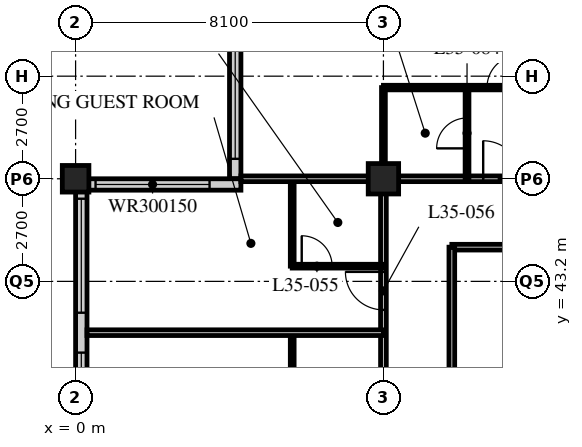
"""IFC4 building model, lengths in metres.
Left out: names, types, materials, properties, quantities, classifications, styles, units other than length and angle.
Written with IfcOpenShell. Run it as: python <this file> out.ifc"""

import sys

from ifc_helpers import new_model, si_unit, direction, frame, frame_2d, origin, origin_2d, place, context, subcontext, project, spatial, rectangle, hollow_rectangle, extrude, element, fill, save


model = new_model("IFC4")
c1 = context("Model", 3, precision=1e-05, world=origin(), true_north=direction((0.0, 1.0)))
c2 = subcontext(c1, "Body", "Model", "MODEL_VIEW")
j1 = project(units=[si_unit("LENGTHUNIT", "METRE"), si_unit("PLANEANGLEUNIT", "RADIAN")], contexts=[c1])
p1 = place(None, origin())
s1 = spatial("IfcSite", under=j1, at=p1, CompositionType="ELEMENT")
p2 = place(p1, origin())
s2 = spatial("IfcBuilding", under=s1, at=p2, CompositionType="ELEMENT")
p3 = place(p2, frame((0.0, 0.0, 137.4)))
s3 = spatial("IfcBuildingStorey", under=s2, at=p3, CompositionType="ELEMENT", Elevation=137.4)
p4 = place(p3, frame((0.0, 45.9, 0.0), z_axis=(0.0, 0.0, 1.0), x_axis=(1.0, 0.0, 0.0)))
e1 = element("IfcColumn", 1, at=p4, inside=s3, PredefinedType="COLUMN", context=c2, shape_type="SweptSolid", body=[
    extrude(hollow_rectangle(XDim=0.7, YDim=0.7, WallThickness=0.07, at=origin_2d()), origin(), (0.0, 0.0, 1.0), 3.4),
])
p5 = place(p3, frame((8.1, 45.9, 0.0), z_axis=(0.0, 0.0, 1.0), x_axis=(1.0, 0.0, 0.0)))
e2 = element("IfcColumn", 2, at=p5, inside=s3, PredefinedType="COLUMN", context=c2, shape_type="SweptSolid", body=[
    extrude(hollow_rectangle(XDim=0.8, YDim=0.8, WallThickness=0.08, at=origin_2d()), origin(), (0.0, 0.0, 1.0), 3.4),
])
p6 = place(p3, frame((4.2, 49.65, 0.0), z_axis=(0.0, 0.0, 1.0), x_axis=(0.0, -1.0, 0.0)))
e3 = element("IfcWall", 3, at=p6, inside=s3, PredefinedType="SOLIDWALL", context=c2, shape_type="SweptSolid", body=[
    extrude(rectangle(XDim=3.75, YDim=0.3, at=frame_2d((1.875, 0.0))), origin(), (0.0, 0.0, 1.0), 3.19),
])
p7 = place(p6, frame((0.225, 0.0, 0.9)))
e4 = element("IfcOpeningElement", 4, at=p7, cuts=e3, PredefinedType="OPENING", context=c2, shape_type="SweptSolid", body=[
    extrude(rectangle(XDim=3.0, YDim=1.5, at=frame_2d((1.5, 0.75))), frame((0.0, 0.16, 0.0), z_axis=(0.0, -1.0, 0.0), x_axis=(1.0, 0.0, 0.0)), (0.0, 0.0, 1.0), 0.32),
])
p8 = place(p3, frame((4.35, 45.75, 0.0), z_axis=(0.0, 0.0, 1.0), x_axis=(-1.0, 0.0, 0.0)))
e5 = element("IfcWall", 5, at=p8, inside=s3, PredefinedType="SOLIDWALL", context=c2, shape_type="SweptSolid", body=[
    extrude(rectangle(XDim=4.35, YDim=0.3, at=frame_2d((2.175, 0.0))), origin(), (0.0, 0.0, 1.0), 3.19),
])
p9 = place(p8, frame((0.825, 0.0, 0.9)))
e6 = element("IfcOpeningElement", 6, at=p9, cuts=e5, PredefinedType="OPENING", context=c2, shape_type="SweptSolid", body=[
    extrude(rectangle(XDim=3.0, YDim=1.5, at=frame_2d((1.5, 0.75))), frame((0.0, 0.16, 0.0), z_axis=(0.0, -1.0, 0.0), x_axis=(1.0, 0.0, 0.0)), (0.0, 0.0, 1.0), 0.32),
])
p10 = place(p3, frame((0.15, 45.6, 0.0), z_axis=(0.0, 0.0, 1.0), x_axis=(0.0, -1.0, 0.0)))
e7 = element("IfcWall", 7, at=p10, inside=s3, PredefinedType="SOLIDWALL", context=c2, shape_type="SweptSolid", body=[
    extrude(rectangle(XDim=32.1, YDim=0.3, at=frame_2d((16.05, 0.0))), origin(), (0.0, 0.0, 1.0), 3.19),
])
p11 = place(p10, frame((0.225, 0.0, 0.9)))
e8 = element("IfcOpeningElement", 8, at=p11, cuts=e7, PredefinedType="OPENING", context=c2, shape_type="SweptSolid", body=[
    extrude(rectangle(XDim=3.0, YDim=2.0, at=frame_2d((1.5, 1.0))), frame((0.0, 0.16, 0.0), z_axis=(0.0, -1.0, 0.0), x_axis=(1.0, 0.0, 0.0)), (0.0, 0.0, 1.0), 0.32),
])
p12 = place(p10, frame((4.275, 0.0, 0.9)))
e9 = element("IfcOpeningElement", 9, at=p12, cuts=e7, PredefinedType="OPENING", context=c2, shape_type="SweptSolid", body=[
    extrude(rectangle(XDim=3.0, YDim=2.0, at=frame_2d((1.5, 1.0))), frame((0.0, 0.16, 0.0), z_axis=(0.0, -1.0, 0.0), x_axis=(1.0, 0.0, 0.0)), (0.0, 0.0, 1.0), 0.32),
])
p13 = place(p10, frame((8.325, 0.0, 0.9)))
e10 = element("IfcOpeningElement", 10, at=p13, cuts=e7, PredefinedType="OPENING", context=c2, shape_type="SweptSolid", body=[
    extrude(rectangle(XDim=3.0, YDim=2.0, at=frame_2d((1.5, 1.0))), frame((0.0, 0.16, 0.0), z_axis=(0.0, -1.0, 0.0), x_axis=(1.0, 0.0, 0.0)), (0.0, 0.0, 1.0), 0.32),
])
p14 = place(p10, frame((12.375, 0.0, 0.9)))
e11 = element("IfcOpeningElement", 11, at=p14, cuts=e7, PredefinedType="OPENING", context=c2, shape_type="SweptSolid", body=[
    extrude(rectangle(XDim=3.0, YDim=2.0, at=frame_2d((1.5, 1.0))), frame((0.0, 0.16, 0.0), z_axis=(0.0, -1.0, 0.0), x_axis=(1.0, 0.0, 0.0)), (0.0, 0.0, 1.0), 0.32),
])
p15 = place(p10, frame((16.425, 0.0, 0.9)))
e12 = element("IfcOpeningElement", 12, at=p15, cuts=e7, PredefinedType="OPENING", context=c2, shape_type="SweptSolid", body=[
    extrude(rectangle(XDim=3.0, YDim=2.0, at=frame_2d((1.5, 1.0))), frame((0.0, 0.16, 0.0), z_axis=(0.0, -1.0, 0.0), x_axis=(1.0, 0.0, 0.0)), (0.0, 0.0, 1.0), 0.32),
])
p16 = place(p10, frame((20.475, 0.0, 0.9)))
e13 = element("IfcOpeningElement", 13, at=p16, cuts=e7, PredefinedType="OPENING", context=c2, shape_type="SweptSolid", body=[
    extrude(rectangle(XDim=3.0, YDim=2.0, at=frame_2d((1.5, 1.0))), frame((0.0, 0.16, 0.0), z_axis=(0.0, -1.0, 0.0), x_axis=(1.0, 0.0, 0.0)), (0.0, 0.0, 1.0), 0.32),
])
p17 = place(p10, frame((24.525, 0.0, 0.9)))
e14 = element("IfcOpeningElement", 14, at=p17, cuts=e7, PredefinedType="OPENING", context=c2, shape_type="SweptSolid", body=[
    extrude(rectangle(XDim=3.0, YDim=2.0, at=frame_2d((1.5, 1.0))), frame((0.0, 0.16, 0.0), z_axis=(0.0, -1.0, 0.0), x_axis=(1.0, 0.0, 0.0)), (0.0, 0.0, 1.0), 0.32),
])
p18 = place(p10, frame((28.575, 0.0, 0.9)))
e15 = element("IfcOpeningElement", 15, at=p18, cuts=e7, PredefinedType="OPENING", context=c2, shape_type="SweptSolid", body=[
    extrude(rectangle(XDim=3.0, YDim=2.0, at=frame_2d((1.5, 1.0))), frame((0.0, 0.16, 0.0), z_axis=(0.0, -1.0, 0.0), x_axis=(1.0, 0.0, 0.0)), (0.0, 0.0, 1.0), 0.32),
])
p19 = place(p3, frame((8.1, 45.9, 0.0), z_axis=(0.0, 0.0, 1.0), x_axis=(1.0, 0.0, 0.0)))
e16 = element("IfcWall", 16, at=p19, inside=s3, PredefinedType="PARTITIONING", context=c2, shape_type="SweptSolid", body=[
    extrude(rectangle(XDim=36.45, YDim=0.15, at=frame_2d((18.225, 0.0))), origin(), (0.0, 0.0, 1.0), 2.578),
])
p20 = place(p19, frame((9.625, 0.0, 0.0)))
e17 = element("IfcOpeningElement", 17, at=p20, cuts=e16, PredefinedType="OPENING", context=c2, shape_type="SweptSolid", body=[
    extrude(rectangle(XDim=1.0, YDim=2.1, at=frame_2d((0.5, 1.05))), frame((0.0, 0.085, 0.0), z_axis=(0.0, -1.0, 0.0), x_axis=(1.0, 0.0, 0.0)), (0.0, 0.0, 1.0), 0.17),
])
p21 = place(p19, frame((21.775, 0.0, 0.0)))
e18 = element("IfcOpeningElement", 18, at=p21, cuts=e16, PredefinedType="OPENING", context=c2, shape_type="SweptSolid", body=[
    extrude(rectangle(XDim=1.0, YDim=2.1, at=frame_2d((0.5, 1.05))), frame((0.0, 0.085, 0.0), z_axis=(0.0, -1.0, 0.0), x_axis=(1.0, 0.0, 0.0)), (0.0, 0.0, 1.0), 0.17),
])
p22 = place(p19, frame((28.95, 0.0, 0.0)))
e19 = element("IfcOpeningElement", 19, at=p22, cuts=e16, PredefinedType="OPENING", context=c2, shape_type="SweptSolid", body=[
    extrude(rectangle(XDim=1.0, YDim=2.1, at=frame_2d((0.5, 1.05))), frame((0.0, 0.085, 0.0), z_axis=(0.0, -1.0, 0.0), x_axis=(1.0, 0.0, 0.0)), (0.0, 0.0, 1.0), 0.17),
])
p23 = place(p19, frame((33.925, 0.0, 0.0)))
e20 = element("IfcOpeningElement", 20, at=p23, cuts=e16, PredefinedType="OPENING", context=c2, shape_type="SweptSolid", body=[
    extrude(rectangle(XDim=1.0, YDim=2.1, at=frame_2d((0.5, 1.05))), frame((0.0, 0.085, 0.0), z_axis=(0.0, -1.0, 0.0), x_axis=(1.0, 0.0, 0.0)), (0.0, 0.0, 1.0), 0.17),
])
p24 = place(p19, frame((2.625, 0.0, 0.0)))
e21 = element("IfcOpeningElement", 21, at=p24, cuts=e16, PredefinedType="OPENING", context=c2, shape_type="SweptSolid", body=[
    extrude(rectangle(XDim=1.0, YDim=2.1, at=frame_2d((0.5, 1.05))), frame((0.0, 0.085, 0.0), z_axis=(0.0, -1.0, 0.0), x_axis=(1.0, 0.0, 0.0)), (0.0, 0.0, 1.0), 0.17),
])
p25 = place(p3, frame((8.1, 17.55, 0.0), z_axis=(0.0, 0.0, 1.0), x_axis=(0.0, 1.0, 0.0)))
e22 = element("IfcWall", 22, at=p25, inside=s3, PredefinedType="PARTITIONING", context=c2, shape_type="SweptSolid", body=[
    extrude(rectangle(XDim=28.35, YDim=0.15, at=frame_2d((14.175, 0.0))), origin(), (0.0, 0.0, 1.0), 2.578),
])
p26 = place(p25, frame((1.9, 0.0, 0.0)))
e23 = element("IfcOpeningElement", 23, at=p26, cuts=e22, PredefinedType="OPENING", context=c2, shape_type="SweptSolid", body=[
    extrude(rectangle(XDim=1.0, YDim=2.1, at=frame_2d((0.5, 1.05))), frame((0.0, 0.085, 0.0), z_axis=(0.0, -1.0, 0.0), x_axis=(1.0, 0.0, 0.0)), (0.0, 0.0, 1.0), 0.17),
])
p27 = place(p25, frame((10.0, 0.0, 0.0)))
e24 = element("IfcOpeningElement", 24, at=p27, cuts=e22, PredefinedType="OPENING", context=c2, shape_type="SweptSolid", body=[
    extrude(rectangle(XDim=1.0, YDim=2.1, at=frame_2d((0.5, 1.05))), frame((0.0, 0.085, 0.0), z_axis=(0.0, -1.0, 0.0), x_axis=(1.0, 0.0, 0.0)), (0.0, 0.0, 1.0), 0.17),
])
p28 = place(p25, frame((18.1, 0.0, 0.0)))
e25 = element("IfcOpeningElement", 25, at=p28, cuts=e22, PredefinedType="OPENING", context=c2, shape_type="SweptSolid", body=[
    extrude(rectangle(XDim=1.0, YDim=2.1, at=frame_2d((0.5, 1.05))), frame((0.0, 0.085, 0.0), z_axis=(0.0, -1.0, 0.0), x_axis=(1.0, 0.0, 0.0)), (0.0, 0.0, 1.0), 0.17),
])
p29 = place(p25, frame((24.9, 0.0, 0.0)))
e26 = element("IfcOpeningElement", 26, at=p29, cuts=e22, PredefinedType="OPENING", context=c2, shape_type="SweptSolid", body=[
    extrude(rectangle(XDim=1.0, YDim=2.1, at=frame_2d((0.5, 1.05))), frame((0.0, 0.085, 0.0), z_axis=(0.0, -1.0, 0.0), x_axis=(1.0, 0.0, 0.0)), (0.0, 0.0, 1.0), 0.17),
])
p30 = place(p3, frame((27.14, 44.1, 0.0), z_axis=(0.0, 0.0, 1.0), x_axis=(-1.0, 0.0, 0.0)))
e27 = element("IfcWall", 27, at=p30, inside=s3, PredefinedType="PARTITIONING", context=c2, shape_type="SweptSolid", body=[
    extrude(rectangle(XDim=17.24, YDim=0.15, at=frame_2d((8.62, 0.0))), origin(), (0.0, 0.0, 1.0), 3.19),
])
p31 = place(p30, frame((13.59, 0.0, 0.0)))
e28 = element("IfcOpeningElement", 28, at=p31, cuts=e27, PredefinedType="OPENING", context=c2, shape_type="SweptSolid", body=[
    extrude(rectangle(XDim=1.0, YDim=2.1, at=frame_2d((0.5, 1.05))), frame((0.0, 0.085, 0.0), z_axis=(0.0, -1.0, 0.0), x_axis=(1.0, 0.0, 0.0)), (0.0, 0.0, 1.0), 0.17),
])
p32 = place(p30, frame((9.051, 0.0, 0.0)))
e29 = element("IfcOpeningElement", 29, at=p32, cuts=e27, PredefinedType="OPENING", context=c2, shape_type="SweptSolid", body=[
    extrude(rectangle(XDim=1.0, YDim=2.1, at=frame_2d((0.5, 1.05))), frame((0.0, 0.085, 0.0), z_axis=(0.0, -1.0, 0.0), x_axis=(1.0, 0.0, 0.0)), (0.0, 0.0, 1.0), 0.17),
])
p33 = place(p30, frame((3.576, 0.0, 0.0)))
e30 = element("IfcOpeningElement", 30, at=p33, cuts=e27, PredefinedType="OPENING", context=c2, shape_type="SweptSolid", body=[
    extrude(rectangle(XDim=1.0, YDim=2.1, at=frame_2d((0.5, 1.05))), frame((0.0, 0.085, 0.0), z_axis=(0.0, -1.0, 0.0), x_axis=(1.0, 0.0, 0.0)), (0.0, 0.0, 1.0), 0.17),
])
p34 = place(p3, frame((9.9, 44.1, 0.0), z_axis=(0.0, 0.0, 1.0), x_axis=(0.0, -1.0, 0.0)))
e31 = element("IfcWall", 31, at=p34, inside=s3, PredefinedType="PARTITIONING", context=c2, shape_type="SweptSolid", body=[
    extrude(rectangle(XDim=24.75, YDim=0.15, at=frame_2d((12.375, 0.0))), origin(), (0.0, 0.0, 1.0), 3.19),
])
p35 = place(p34, frame((17.871, 0.0, 0.0)))
e32 = element("IfcOpeningElement", 32, at=p35, cuts=e31, PredefinedType="OPENING", context=c2, shape_type="SweptSolid", body=[
    extrude(rectangle(XDim=1.0, YDim=2.1, at=frame_2d((0.5, 1.05))), frame((0.0, 0.085, 0.0), z_axis=(0.0, -1.0, 0.0), x_axis=(1.0, 0.0, 0.0)), (0.0, 0.0, 1.0), 0.17),
])
p36 = place(p34, frame((13.821, 0.0, 0.0)))
e33 = element("IfcOpeningElement", 33, at=p36, cuts=e31, PredefinedType="OPENING", context=c2, shape_type="SweptSolid", body=[
    extrude(rectangle(XDim=1.0, YDim=2.1, at=frame_2d((0.5, 1.05))), frame((0.0, 0.085, 0.0), z_axis=(0.0, -1.0, 0.0), x_axis=(1.0, 0.0, 0.0)), (0.0, 0.0, 1.0), 0.17),
])
p37 = place(p34, frame((10.4, 0.0, 0.0)))
e34 = element("IfcOpeningElement", 34, at=p37, cuts=e31, PredefinedType="OPENING", context=c2, shape_type="SweptSolid", body=[
    extrude(rectangle(XDim=1.0, YDim=2.1, at=frame_2d((0.5, 1.05))), frame((0.0, 0.085, 0.0), z_axis=(0.0, -1.0, 0.0), x_axis=(1.0, 0.0, 0.0)), (0.0, 0.0, 1.0), 0.17),
])
p38 = place(p34, frame((6.35, 0.0, 0.0)))
e35 = element("IfcOpeningElement", 35, at=p38, cuts=e31, PredefinedType="OPENING", context=c2, shape_type="SweptSolid", body=[
    extrude(rectangle(XDim=1.0, YDim=2.1, at=frame_2d((0.5, 1.05))), frame((0.0, 0.085, 0.0), z_axis=(0.0, -1.0, 0.0), x_axis=(1.0, 0.0, 0.0)), (0.0, 0.0, 1.0), 0.17),
])
p39 = place(p3, frame((5.7, 39.25, 0.0), z_axis=(0.0, 0.0, 1.0), x_axis=(0.0, 1.0, 0.0)))
e36 = element("IfcWall", 36, at=p39, inside=s3, PredefinedType="PARTITIONING", context=c2, shape_type="SweptSolid", body=[
    extrude(rectangle(XDim=2.6, YDim=0.1, at=frame_2d((1.3, 0.0))), origin(), (0.0, 0.0, 1.0), 3.19),
])
p40 = place(p3, frame((8.1, 41.85, 0.0), z_axis=(0.0, 0.0, 1.0), x_axis=(-1.0, 0.0, 0.0)))
e37 = element("IfcWall", 37, at=p40, inside=s3, PredefinedType="PARTITIONING", context=c2, shape_type="SweptSolid", body=[
    extrude(rectangle(XDim=7.8, YDim=0.15, at=frame_2d((3.9, 0.0))), origin(), (0.0, 0.0, 1.0), 3.19),
])
p41 = place(p3, frame((5.7, 43.6, 0.0), z_axis=(0.0, 0.0, 1.0), x_axis=(0.0, 1.0, 0.0)))
e38 = element("IfcWall", 38, at=p41, inside=s3, PredefinedType="PARTITIONING", context=c2, shape_type="SweptSolid", body=[
    extrude(rectangle(XDim=2.3, YDim=0.1, at=frame_2d((1.15, 0.0))), origin(), (0.0, 0.0, 1.0), 3.19),
])
p42 = place(p3, frame((8.1, 43.6, 0.0), z_axis=(0.0, 0.0, 1.0), x_axis=(-1.0, 0.0, 0.0)))
e39 = element("IfcWall", 39, at=p42, inside=s3, PredefinedType="PARTITIONING", context=c2, shape_type="SweptSolid", body=[
    extrude(rectangle(XDim=2.4, YDim=0.1, at=frame_2d((1.2, 0.0))), origin(), (0.0, 0.0, 1.0), 3.19),
])
p43 = place(p42, frame((1.35, 0.0, 0.0)))
e40 = element("IfcOpeningElement", 40, at=p43, cuts=e39, PredefinedType="OPENING", context=c2, shape_type="SweptSolid", body=[
    extrude(rectangle(XDim=0.8, YDim=2.1, at=frame_2d((0.4, 1.05))), frame((0.0, 0.06, 0.0), z_axis=(0.0, -1.0, 0.0), x_axis=(1.0, 0.0, 0.0)), (0.0, 0.0, 1.0), 0.12),
])
p44 = place(p3, frame((8.1, 48.3, 0.0), z_axis=(0.0, 0.0, 1.0), x_axis=(1.0, 0.0, 0.0)))
e41 = element("IfcWall", 41, at=p44, inside=s3, PredefinedType="PARTITIONING", context=c2, shape_type="SweptSolid", body=[
    extrude(rectangle(XDim=4.05, YDim=0.12, at=frame_2d((2.025, 0.0))), origin(), (0.0, 0.0, 1.0), 3.19),
])
p45 = place(p44, frame((2.725, 0.0, 0.0)))
e42 = element("IfcOpeningElement", 42, at=p45, cuts=e41, PredefinedType="OPENING", context=c2, shape_type="SweptSolid", body=[
    extrude(rectangle(XDim=0.85, YDim=2.1, at=frame_2d((0.425, 1.05))), frame((0.0, 0.07, 0.0), z_axis=(0.0, -1.0, 0.0), x_axis=(1.0, 0.0, 0.0)), (0.0, 0.0, 1.0), 0.14),
])
p46 = place(p3, frame((10.3, 45.9, 0.0), z_axis=(0.0, 0.0, 1.0), x_axis=(0.0, 1.0, 0.0)))
e43 = element("IfcWall", 43, at=p46, inside=s3, PredefinedType="PARTITIONING", context=c2, shape_type="SweptSolid", body=[
    extrude(rectangle(XDim=2.4, YDim=0.1, at=frame_2d((1.2, 0.0))), origin(), (0.0, 0.0, 1.0), 3.19),
])
p47 = place(p46, frame((0.8, 0.0, 0.0)))
e44 = element("IfcOpeningElement", 44, at=p47, cuts=e43, PredefinedType="OPENING", context=c2, shape_type="SweptSolid", body=[
    extrude(rectangle(XDim=0.8, YDim=2.1, at=frame_2d((0.4, 1.05))), frame((0.0, 0.06, 0.0), z_axis=(0.0, -1.0, 0.0), x_axis=(1.0, 0.0, 0.0)), (0.0, 0.0, 1.0), 0.12),
])
p48 = place(p3, frame((8.1, 45.9, 0.0), z_axis=(0.0, 0.0, 1.0), x_axis=(0.0, 1.0, 0.0)))
e45 = element("IfcWall", 45, at=p48, inside=s3, PredefinedType="PARTITIONING", context=c2, shape_type="SweptSolid", body=[
    extrude(rectangle(XDim=2.4, YDim=0.1, at=frame_2d((1.2, 0.0))), origin(), (0.0, 0.0, 1.0), 2.578),
])
p49 = place(p3, frame((4.35, 45.9, 0.0), z_axis=(0.0, 0.0, 1.0), x_axis=(1.0, 0.0, 0.0)))
e46 = element("IfcWall", 46, at=p49, inside=s3, PredefinedType="PARTITIONING", context=c2, shape_type="SweptSolid", body=[
    extrude(rectangle(XDim=3.75, YDim=0.15, at=frame_2d((1.875, 0.0))), origin(), (0.0, 0.0, 1.0), 2.578),
])
p50 = place(p7, origin())
e47 = element("IfcWindow", 47, at=p50, inside=s3, PartitioningType="SINGLE_PANEL", PredefinedType="WINDOW", context=c2, shape_type="SweptSolid", body=[
    extrude(rectangle(XDim=3.0, YDim=1.5, at=frame_2d((1.5, 0.75))), frame((0.0, 0.03, 0.0), z_axis=(0.0, -1.0, 0.0), x_axis=(1.0, 0.0, 0.0)), (0.0, 0.0, 1.0), 0.06),
])
fill(e4, e47)
p51 = place(p9, origin())
e48 = element("IfcWindow", 48, at=p51, inside=s3, PartitioningType="SINGLE_PANEL", PredefinedType="WINDOW", context=c2, shape_type="SweptSolid", body=[
    extrude(rectangle(XDim=3.0, YDim=1.5, at=frame_2d((1.5, 0.75))), frame((0.0, 0.03, 0.0), z_axis=(0.0, -1.0, 0.0), x_axis=(1.0, 0.0, 0.0)), (0.0, 0.0, 1.0), 0.06),
])
fill(e6, e48)
p52 = place(p11, origin())
e49 = element("IfcWindow", 49, at=p52, inside=s3, PartitioningType="SINGLE_PANEL", PredefinedType="WINDOW", context=c2, shape_type="SweptSolid", body=[
    extrude(rectangle(XDim=3.0, YDim=2.0, at=frame_2d((1.5, 1.0))), frame((0.0, 0.03, 0.0), z_axis=(0.0, -1.0, 0.0), x_axis=(1.0, 0.0, 0.0)), (0.0, 0.0, 1.0), 0.06),
])
fill(e8, e49)
p53 = place(p12, origin())
e50 = element("IfcWindow", 50, at=p53, inside=s3, PartitioningType="SINGLE_PANEL", PredefinedType="WINDOW", context=c2, shape_type="SweptSolid", body=[
    extrude(rectangle(XDim=3.0, YDim=2.0, at=frame_2d((1.5, 1.0))), frame((0.0, 0.03, 0.0), z_axis=(0.0, -1.0, 0.0), x_axis=(1.0, 0.0, 0.0)), (0.0, 0.0, 1.0), 0.06),
])
fill(e9, e50)
p54 = place(p43, origin())
e51 = element("IfcDoor", 51, at=p54, inside=s3, OperationType="SINGLE_SWING_LEFT", PredefinedType="DOOR", context=c2, shape_type="SweptSolid", body=[
    extrude(rectangle(XDim=0.8, YDim=2.1, at=frame_2d((0.4, 1.05))), frame((0.0, 0.025, 0.0), z_axis=(0.0, -1.0, 0.0), x_axis=(1.0, 0.0, 0.0)), (0.0, 0.0, 1.0), 0.05),
])
fill(e40, e51)
p55 = place(p29, origin())
e52 = element("IfcDoor", 52, at=p55, inside=s3, OperationType="SINGLE_SWING_RIGHT", PredefinedType="DOOR", context=c2, shape_type="SweptSolid", body=[
    extrude(rectangle(XDim=1.0, YDim=2.1, at=frame_2d((0.5, 1.05))), frame((0.0, 0.025, 0.0), z_axis=(0.0, -1.0, 0.0), x_axis=(1.0, 0.0, 0.0)), (0.0, 0.0, 1.0), 0.05),
])
fill(e26, e52)
p56 = place(p47, origin())
e53 = element("IfcDoor", 53, at=p56, inside=s3, OperationType="SINGLE_SWING_LEFT", PredefinedType="DOOR", context=c2, shape_type="SweptSolid", body=[
    extrude(rectangle(XDim=0.8, YDim=2.1, at=frame_2d((0.4, 1.05))), frame((0.0, 0.025, 0.0), z_axis=(0.0, -1.0, 0.0), x_axis=(1.0, 0.0, 0.0)), (0.0, 0.0, 1.0), 0.05),
])
fill(e44, e53)
p57 = place(p24, origin())
e54 = element("IfcDoor", 54, at=p57, inside=s3, OperationType="SINGLE_SWING_LEFT", PredefinedType="DOOR", context=c2, shape_type="SweptSolid", body=[
    extrude(rectangle(XDim=1.0, YDim=2.1, at=frame_2d((0.5, 1.05))), frame((0.0, 0.025, 0.0), z_axis=(0.0, -1.0, 0.0), x_axis=(1.0, 0.0, 0.0)), (0.0, 0.0, 1.0), 0.05),
])
fill(e21, e54)
p58 = place(p45, origin())
e55 = element("IfcDoor", 55, at=p58, inside=s3, OperationType="SINGLE_SWING_RIGHT", PredefinedType="DOOR", context=c2, shape_type="SweptSolid", body=[
    extrude(rectangle(XDim=0.85, YDim=2.1, at=frame_2d((0.425, 1.05))), frame((0.0, 0.025, 0.0), z_axis=(0.0, -1.0, 0.0), x_axis=(1.0, 0.0, 0.0)), (0.0, 0.0, 1.0), 0.05),
])
fill(e42, e55)
save(model, sys.argv[1])
